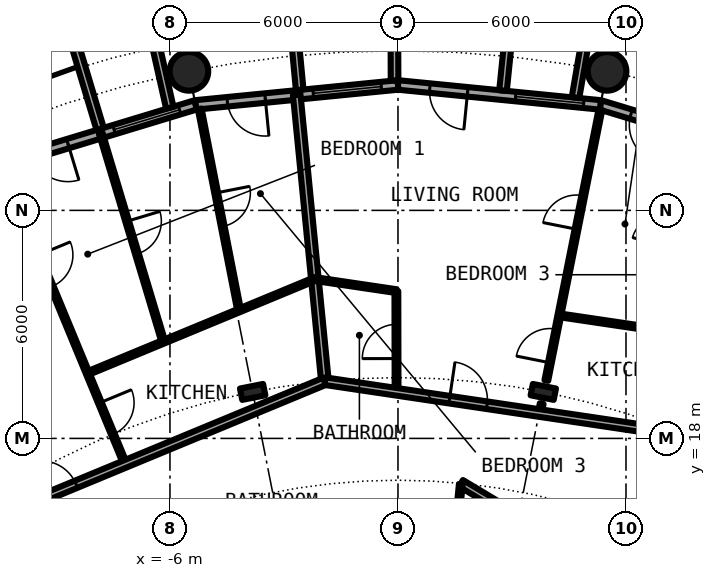
"""IFC4 building model, lengths in metres.
Left out: names, types, materials, properties, quantities, classifications, styles, units other than length and angle.
Written with IfcOpenShell. Run it as: python <this file> out.ifc"""

import sys

from ifc_helpers import new_model, si_unit, direction, frame, frame_2d, origin, origin_2d, place, context, subcontext, project, spatial, rectangle, hollow_circle, i_section, extrude, element, fill, save


model = new_model("IFC4")
c1 = context("Model", 3, precision=1e-05, world=origin(), true_north=direction((0.0, 1.0)))
c2 = subcontext(c1, "Body", "Model", "MODEL_VIEW")
j1 = project(units=[si_unit("LENGTHUNIT", "METRE"), si_unit("PLANEANGLEUNIT", "RADIAN")], contexts=[c1])
p1 = place(None, origin())
s1 = spatial("IfcSite", under=j1, at=p1, CompositionType="ELEMENT")
p2 = place(p1, origin())
s2 = spatial("IfcBuilding", under=s1, at=p2, CompositionType="ELEMENT")
p3 = place(p2, frame((0.0, 0.0, 47.2)))
s3 = spatial("IfcBuildingStorey", under=s2, at=p3, CompositionType="ELEMENT", Elevation=47.2)
for number, where, z_axis, x_axis in (
    (1, (5.501, 27.658, 0.0), (0.0, 0.0, 1.0), (1.0, 0.0, 0.0)),
    (2, (-5.501, 27.658, 0.0), (0.0, 0.0, 1.0), (1.0, 0.0, 0.0)),
):
    element("IfcColumn", number, at=place(p3, frame(where, z_axis=z_axis, x_axis=x_axis)), inside=s3, PredefinedType="COLUMN", context=c2, shape_type="SweptSolid", body=[
        extrude(hollow_circle(Radius=0.508, WallThickness=0.05, at=origin_2d()), origin(), (0.0, 0.0, 1.0), 3.05),
    ])
for number, where, z_axis, x_axis in (
    (3, (3.824, 19.223, 0.0), (0.0, 0.0, 1.0), (0.195, 0.981, 0.0)),
    (4, (-3.824, 19.223, 0.0), (0.0, 0.0, 1.0), (-0.195, 0.981, 0.0)),
):
    element("IfcColumn", number, at=place(p3, frame(where, z_axis=z_axis, x_axis=x_axis)), inside=s3, PredefinedType="COLUMN", context=c2, shape_type="SweptSolid", body=[
        extrude(i_section(OverallWidth=0.305, OverallDepth=0.62, WebThickness=0.021, FlangeThickness=0.04, FilletRadius=0.027, at=origin_2d()), origin(), (0.0, 0.0, 1.0), 3.05),
    ])
p4 = place(p3, frame((10.447, 25.222, 0.0), z_axis=(0.0, 0.0, 1.0), x_axis=(-0.956965678721, 0.290201119486, 0.0)))
e5 = element("IfcWall", 5, at=p4, inside=s3, PredefinedType="SOLIDWALL", context=c2, shape_type="SweptSolid", body=[
    extrude(rectangle(XDim=5.351, YDim=0.25, at=frame_2d((2.676, 0.0))), origin(), (0.0, 0.0, 1.0), 2.7),
])
p5 = place(p4, frame((0.441, 0.0, 0.3)))
e6 = element("IfcOpeningElement", 6, at=p5, cuts=e5, PredefinedType="OPENING", context=c2, shape_type="SweptSolid", body=[
    extrude(rectangle(XDim=1.8, YDim=2.1, at=frame_2d((0.9, 1.05))), frame((0.0, 0.135, 0.0), z_axis=(0.0, -1.0, 0.0), x_axis=(1.0, 0.0, 0.0)), (0.0, 0.0, 1.0), 0.27),
])
p6 = place(p4, frame((3.51, 0.0, 0.0)))
e7 = element("IfcOpeningElement", 7, at=p6, cuts=e5, PredefinedType="OPENING", context=c2, shape_type="SweptSolid", body=[
    extrude(rectangle(XDim=1.0, YDim=2.2, at=frame_2d((0.5, 1.1))), frame((0.0, 0.135, 0.0), z_axis=(0.0, -1.0, 0.0), x_axis=(1.0, 0.0, 0.0)), (0.0, 0.0, 1.0), 0.27),
])
p7 = place(p3, frame((5.326, 26.775, 0.0), z_axis=(0.0, 0.0, 1.0), x_axis=(-0.995173996315, 0.098126026407, 0.0)))
e8 = element("IfcWall", 8, at=p7, inside=s3, PredefinedType="SOLIDWALL", context=c2, shape_type="SweptSolid", body=[
    extrude(rectangle(XDim=5.352, YDim=0.25, at=frame_2d((2.676, 0.0))), origin(), (0.0, 0.0, 1.0), 2.7),
])
p8 = place(p7, frame((0.441, 0.0, 0.3)))
e9 = element("IfcOpeningElement", 9, at=p8, cuts=e8, PredefinedType="OPENING", context=c2, shape_type="SweptSolid", body=[
    extrude(rectangle(XDim=1.8, YDim=2.1, at=frame_2d((0.9, 1.05))), frame((0.0, 0.135, 0.0), z_axis=(0.0, -1.0, 0.0), x_axis=(1.0, 0.0, 0.0)), (0.0, 0.0, 1.0), 0.27),
])
p9 = place(p7, frame((3.51, 0.0, 0.0)))
e10 = element("IfcOpeningElement", 10, at=p9, cuts=e8, PredefinedType="OPENING", context=c2, shape_type="SweptSolid", body=[
    extrude(rectangle(XDim=1.0, YDim=2.2, at=frame_2d((0.5, 1.1))), frame((0.0, 0.135, 0.0), z_axis=(0.0, -1.0, 0.0), x_axis=(1.0, 0.0, 0.0)), (0.0, 0.0, 1.0), 0.27),
])
p10 = place(p3, frame((4.671, 26.966, -0.03), z_axis=(0.0, 0.0, 1.0), x_axis=(0.170539878907, 0.985350774954, 0.0)))
e11 = element("IfcWall", 11, at=p10, inside=s3, PredefinedType="SOLIDWALL", context=c2, shape_type="SweptSolid", body=[
    extrude(rectangle(XDim=2.932, YDim=0.2, at=frame_2d((1.466, 0.0))), origin(), (0.0, 0.0, 1.0), 2.73),
])
p11 = place(p3, frame((2.764, 27.153, -0.03), z_axis=(0.0, 0.0, 1.0), x_axis=(0.101505487237, 0.994834979311, 0.0)))
e12 = element("IfcWall", 12, at=p11, inside=s3, PredefinedType="SOLIDWALL", context=c2, shape_type="SweptSolid", body=[
    extrude(rectangle(XDim=3.007, YDim=0.2, at=frame_2d((1.503, 0.0))), origin(), (0.0, 0.0, 1.0), 2.73),
])
p12 = place(p3, frame((0.0, 27.3, 0.0), z_axis=(0.0, 0.0, 1.0), x_axis=(-0.995173996315, -0.098126026407, 0.0)))
e13 = element("IfcWall", 13, at=p12, inside=s3, PredefinedType="SOLIDWALL", context=c2, shape_type="SweptSolid", body=[
    extrude(rectangle(XDim=5.352, YDim=0.25, at=frame_2d((2.676, 0.0))), origin(), (0.0, 0.0, 1.0), 2.7),
])
p13 = place(p12, frame((0.441, 0.0, 0.3)))
e14 = element("IfcOpeningElement", 14, at=p13, cuts=e13, PredefinedType="OPENING", context=c2, shape_type="SweptSolid", body=[
    extrude(rectangle(XDim=1.8, YDim=2.1, at=frame_2d((0.9, 1.05))), frame((0.0, 0.135, 0.0), z_axis=(0.0, -1.0, 0.0), x_axis=(1.0, 0.0, 0.0)), (0.0, 0.0, 1.0), 0.27),
])
p14 = place(p12, frame((3.51, 0.0, 0.0)))
e15 = element("IfcOpeningElement", 15, at=p14, cuts=e13, PredefinedType="OPENING", context=c2, shape_type="SweptSolid", body=[
    extrude(rectangle(XDim=1.0, YDim=2.2, at=frame_2d((0.5, 1.1))), frame((0.0, 0.135, 0.0), z_axis=(0.0, -1.0, 0.0), x_axis=(1.0, 0.0, 0.0)), (0.0, 0.0, 1.0), 0.27),
])
p15 = place(p3, frame((-0.09, 27.417, -0.03), z_axis=(0.0, 0.0, 1.0), x_axis=(-0.00347308367, 0.999993968827, 0.0)))
e16 = element("IfcWall", 16, at=p15, inside=s3, PredefinedType="SOLIDWALL", context=c2, shape_type="SweptSolid", body=[
    extrude(rectangle(XDim=2.882, YDim=0.2, at=frame_2d((1.441, 0.0))), origin(), (0.0, 0.0, 1.0), 2.73),
])
p16 = place(p3, frame((-2.586, 27.171, -0.03), z_axis=(0.0, 0.0, 1.0), x_axis=(-0.094548432284, 0.995520262954, 0.0)))
e17 = element("IfcWall", 17, at=p16, inside=s3, PredefinedType="SOLIDWALL", context=c2, shape_type="SweptSolid", body=[
    extrude(rectangle(XDim=3.006, YDim=0.2, at=frame_2d((1.503, 0.0))), origin(), (0.0, 0.0, 1.0), 2.73),
])
p17 = place(p3, frame((-5.326, 26.775, 0.0), z_axis=(0.0, 0.0, 1.0), x_axis=(-0.956965678721, -0.290201119486, 0.0)))
e18 = element("IfcWall", 18, at=p17, inside=s3, PredefinedType="SOLIDWALL", context=c2, shape_type="SweptSolid", body=[
    extrude(rectangle(XDim=5.351, YDim=0.25, at=frame_2d((2.676, 0.0))), origin(), (0.0, 0.0, 1.0), 2.7),
])
p18 = place(p17, frame((0.441, 0.0, 0.3)))
e19 = element("IfcOpeningElement", 19, at=p18, cuts=e18, PredefinedType="OPENING", context=c2, shape_type="SweptSolid", body=[
    extrude(rectangle(XDim=1.8, YDim=2.1, at=frame_2d((0.9, 1.05))), frame((0.0, 0.135, 0.0), z_axis=(0.0, -1.0, 0.0), x_axis=(1.0, 0.0, 0.0)), (0.0, 0.0, 1.0), 0.27),
])
p19 = place(p17, frame((3.51, 0.0, 0.0)))
e20 = element("IfcOpeningElement", 20, at=p19, cuts=e18, PredefinedType="OPENING", context=c2, shape_type="SweptSolid", body=[
    extrude(rectangle(XDim=1.0, YDim=2.2, at=frame_2d((0.5, 1.1))), frame((0.0, 0.135, 0.0), z_axis=(0.0, -1.0, 0.0), x_axis=(1.0, 0.0, 0.0)), (0.0, 0.0, 1.0), 0.27),
])
p20 = place(p3, frame((-6.004, 26.7, -0.03), z_axis=(0.0, 0.0, 1.0), x_axis=(-0.219609259383, 0.975587911566, 0.0)))
e21 = element("IfcWall", 21, at=p20, inside=s3, PredefinedType="SOLIDWALL", context=c2, shape_type="SweptSolid", body=[
    extrude(rectangle(XDim=2.933, YDim=0.2, at=frame_2d((1.466, 0.0))), origin(), (0.0, 0.0, 1.0), 2.73),
])
p21 = place(p3, frame((-7.837, 26.144, -0.03), z_axis=(0.0, 0.0, 1.0), x_axis=(-0.287064767992, 0.957911174889, 0.0)))
e22 = element("IfcWall", 22, at=p21, inside=s3, PredefinedType="SOLIDWALL", context=c2, shape_type="SweptSolid", body=[
    extrude(rectangle(XDim=3.006, YDim=0.2, at=frame_2d((1.503, 0.0))), origin(), (0.0, 0.0, 1.0), 2.73),
])
p22 = place(p3, frame((-10.398, 25.107, 0.0), z_axis=(0.0, 0.0, 1.0), x_axis=(0.382458509789, -0.923972666419, 0.0)))
e23 = element("IfcWall", 23, at=p22, inside=s3, PredefinedType="PARTITIONING", context=c2, shape_type="SweptSolid", body=[
    extrude(rectangle(XDim=8.419, YDim=0.1, at=frame_2d((4.209, 0.0))), origin(), (0.0, 0.0, 1.0), 2.7),
])
p23 = place(p22, frame((6.677, 0.0, 0.0)))
e24 = element("IfcOpeningElement", 24, at=p23, cuts=e23, PredefinedType="OPENING", context=c2, shape_type="SweptSolid", body=[
    extrude(rectangle(XDim=0.9, YDim=2.3, at=frame_2d((0.45, 1.15))), frame((0.0, 0.06, 0.0), z_axis=(0.0, -1.0, 0.0), x_axis=(1.0, 0.0, 0.0)), (0.0, 0.0, 1.0), 0.12),
])
p24 = place(p22, frame((2.468, 0.0, 0.0)))
e25 = element("IfcOpeningElement", 25, at=p24, cuts=e23, PredefinedType="OPENING", context=c2, shape_type="SweptSolid", body=[
    extrude(rectangle(XDim=0.9, YDim=2.3, at=frame_2d((0.45, 1.15))), frame((0.0, 0.06, 0.0), z_axis=(0.0, -1.0, 0.0), x_axis=(1.0, 0.0, 0.0)), (0.0, 0.0, 1.0), 0.12),
])
p25 = place(p3, frame((-7.821, 26.025, 0.0), z_axis=(0.0, 0.0, 1.0), x_axis=(0.287793773423, -0.957692405723, 0.0)))
e26 = element("IfcWall", 26, at=p25, inside=s3, PredefinedType="PARTITIONING", context=c2, shape_type="SweptSolid", body=[
    extrude(rectangle(XDim=5.726, YDim=0.1, at=frame_2d((2.863, 0.0))), origin(), (0.0, 0.0, 1.0), 2.7),
])
p26 = place(p25, frame((2.413, 0.0, 0.0)))
e27 = element("IfcOpeningElement", 27, at=p26, cuts=e26, PredefinedType="OPENING", context=c2, shape_type="SweptSolid", body=[
    extrude(rectangle(XDim=0.9, YDim=2.3, at=frame_2d((0.45, 1.15))), frame((0.0, 0.06, 0.0), z_axis=(0.0, -1.0, 0.0), x_axis=(1.0, 0.0, 0.0)), (0.0, 0.0, 1.0), 0.12),
])
p27 = place(p3, frame((-5.217, 26.67, 0.0), z_axis=(0.0, 0.0, 1.0), x_axis=(0.192109041462, -0.981373586453, 0.0)))
e28 = element("IfcWall", 28, at=p27, inside=s3, PredefinedType="PARTITIONING", context=c2, shape_type="SweptSolid", body=[
    extrude(rectangle(XDim=5.404, YDim=0.1, at=frame_2d((2.702, 0.0))), origin(), (0.0, 0.0, 1.0), 2.7),
])
p28 = place(p27, frame((2.252, 0.0, 0.0)))
e29 = element("IfcOpeningElement", 29, at=p28, cuts=e28, PredefinedType="OPENING", context=c2, shape_type="SweptSolid", body=[
    extrude(rectangle(XDim=0.9, YDim=2.3, at=frame_2d((0.45, 1.15))), frame((0.0, 0.06, 0.0), z_axis=(0.0, -1.0, 0.0), x_axis=(1.0, 0.0, 0.0)), (0.0, 0.0, 1.0), 0.12),
])
p29 = place(p3, frame((-2.665, 27.044, 0.0), z_axis=(0.0, 0.0, 1.0), x_axis=(0.098083473227, -0.99517819122, 0.0)))
e30 = element("IfcWall", 30, at=p29, inside=s3, PredefinedType="PARTITIONING", context=c2, shape_type="SweptSolid", body=[
    extrude(rectangle(XDim=7.574, YDim=0.2, at=frame_2d((3.787, 0.0))), origin(), (0.0, 0.0, 1.0), 2.7),
])
p30 = place(p3, frame((-0.037, 19.226, 0.0), z_axis=(0.0, 0.0, 1.0), x_axis=(-0.001843314841, 0.999998301094, 0.0)))
e31 = element("IfcWall", 31, at=p30, inside=s3, PredefinedType="PARTITIONING", context=c2, shape_type="SweptSolid", body=[
    extrude(rectangle(XDim=2.649, YDim=0.1, at=frame_2d((1.324, 0.0))), origin(), (0.0, 0.0, 1.0), 2.7),
])
p31 = place(p30, frame((0.875, 0.0, 0.0)))
e32 = element("IfcOpeningElement", 32, at=p31, cuts=e31, PredefinedType="OPENING", context=c2, shape_type="SweptSolid", body=[
    extrude(rectangle(XDim=0.9, YDim=2.3, at=frame_2d((0.45, 1.15))), frame((0.0, 0.06, 0.0), z_axis=(0.0, -1.0, 0.0), x_axis=(1.0, 0.0, 0.0)), (0.0, 0.0, 1.0), 0.12),
])
p32 = place(p3, frame((3.733, 18.667, 0.0), z_axis=(0.0, 0.0, 1.0), x_axis=(0.193340656307, 0.981131688724, 0.0)))
e33 = element("IfcWall", 33, at=p32, inside=s3, PredefinedType="PARTITIONING", context=c2, shape_type="SweptSolid", body=[
    extrude(rectangle(XDim=0.254, YDim=0.1, at=frame_2d((0.127, 0.0))), origin(), (0.0, 0.0, 1.0), 2.7),
])
p33 = place(p3, frame((3.904, 19.524, 0.0), z_axis=(0.0, 0.0, 1.0), x_axis=(0.195857618189, 0.980632343642, 0.0)))
e34 = element("IfcWall", 34, at=p33, inside=s3, PredefinedType="PARTITIONING", context=c2, shape_type="SweptSolid", body=[
    extrude(rectangle(XDim=7.265, YDim=0.1, at=frame_2d((3.632, 0.0))), origin(), (0.0, 0.0, 1.0), 2.7),
])
p34 = place(p33, frame((0.476, 0.0, 0.0)))
e35 = element("IfcOpeningElement", 35, at=p34, cuts=e34, PredefinedType="OPENING", context=c2, shape_type="SweptSolid", body=[
    extrude(rectangle(XDim=0.9, YDim=2.3, at=frame_2d((0.45, 1.15))), frame((0.0, 0.06, 0.0), z_axis=(0.0, -1.0, 0.0), x_axis=(1.0, 0.0, 0.0)), (0.0, 0.0, 1.0), 0.12),
])
p35 = place(p33, frame((4.058, 0.0, 0.0)))
e36 = element("IfcOpeningElement", 36, at=p35, cuts=e34, PredefinedType="OPENING", context=c2, shape_type="SweptSolid", body=[
    extrude(rectangle(XDim=0.9, YDim=2.3, at=frame_2d((0.45, 1.15))), frame((0.0, 0.06, 0.0), z_axis=(0.0, -1.0, 0.0), x_axis=(1.0, 0.0, 0.0)), (0.0, 0.0, 1.0), 0.12),
])
p36 = place(p3, frame((1.658, 16.819, 0.0), z_axis=(0.0, 0.0, 1.0), x_axis=(0.857688434449, -0.514169767113, 0.0)))
e37 = element("IfcWall", 37, at=p36, inside=s3, PredefinedType="PARTITIONING", context=c2, shape_type="SweptSolid", body=[
    extrude(rectangle(XDim=14.429, YDim=0.2, at=frame_2d((7.215, 0.0))), origin(), (0.0, 0.0, 1.0), 2.7),
])
p37 = place(p36, frame((4.316, 0.0, 0.0)))
e38 = element("IfcOpeningElement", 38, at=p37, cuts=e37, PredefinedType="OPENING", context=c2, shape_type="SweptSolid", body=[
    extrude(rectangle(XDim=1.0, YDim=2.3, at=frame_2d((0.5, 1.15))), frame((0.0, 0.11, 0.0), z_axis=(0.0, -1.0, 0.0), x_axis=(1.0, 0.0, 0.0)), (0.0, 0.0, 1.0), 0.22),
])
p38 = place(p3, frame((-12.435, 15.15, 0.0), z_axis=(0.0, 0.0, 1.0), x_axis=(0.923845560554, 0.38276543763, 0.0)))
e39 = element("IfcWall", 39, at=p38, inside=s3, PredefinedType="PARTITIONING", context=c2, shape_type="SweptSolid", body=[
    extrude(rectangle(XDim=11.381, YDim=0.2, at=frame_2d((5.69, 0.0))), origin(), (0.0, 0.0, 1.0), 2.7),
])
p39 = place(p38, frame((3.293, 0.0, 0.0)))
e40 = element("IfcOpeningElement", 40, at=p39, cuts=e39, PredefinedType="OPENING", context=c2, shape_type="SweptSolid", body=[
    extrude(rectangle(XDim=1.0, YDim=2.3, at=frame_2d((0.5, 1.15))), frame((0.0, 0.11, 0.0), z_axis=(0.0, -1.0, 0.0), x_axis=(1.0, 0.0, 0.0)), (0.0, 0.0, 1.0), 0.22),
])
p40 = place(p3, frame((-1.921, 19.506, 0.0), z_axis=(0.0, 0.0, 1.0), x_axis=(0.989134446023, -0.147013767014, 0.0)))
e41 = element("IfcWall", 41, at=p40, inside=s3, PredefinedType="PARTITIONING", context=c2, shape_type="SweptSolid", body=[
    extrude(rectangle(XDim=9.531, YDim=0.2, at=frame_2d((4.765, 0.0))), origin(), (0.0, 0.0, 1.0), 2.38),
])
p41 = place(p40, frame((3.31, 0.0, 0.0)))
e42 = element("IfcOpeningElement", 42, at=p41, cuts=e41, PredefinedType="OPENING", context=c2, shape_type="SweptSolid", body=[
    extrude(rectangle(XDim=1.0, YDim=2.3, at=frame_2d((0.5, 1.15))), frame((0.0, 0.11, 0.0), z_axis=(0.0, -1.0, 0.0), x_axis=(1.0, 0.0, 0.0)), (0.0, 0.0, 1.0), 0.22),
])
p42 = place(p3, frame((-8.166, 19.715, 0.0), z_axis=(0.0, 0.0, 1.0), x_axis=(0.923844914631, 0.382766996632, 0.0)))
e43 = element("IfcWall", 43, at=p42, inside=s3, PredefinedType="PARTITIONING", context=c2, shape_type="SweptSolid", body=[
    extrude(rectangle(XDim=6.474, YDim=0.1, at=frame_2d((3.237, 0.0))), origin(), (0.0, 0.0, 1.0), 2.7),
])
p43 = place(p3, frame((-2.186, 22.193, 0.0), z_axis=(0.0, 0.0, 1.0), x_axis=(0.989171386505, -0.146765009863, 0.0)))
e44 = element("IfcWall", 44, at=p43, inside=s3, PredefinedType="PARTITIONING", context=c2, shape_type="SweptSolid", body=[
    extrude(rectangle(XDim=2.167, YDim=0.1, at=frame_2d((1.084, 0.0))), origin(), (0.0, 0.0, 1.0), 2.7),
])
p44 = place(p3, frame((4.246, 21.239, 0.0), z_axis=(0.0, 0.0, 1.0), x_axis=(0.989178348771, -0.146718077695, 0.0)))
e45 = element("IfcWall", 45, at=p44, inside=s3, PredefinedType="PARTITIONING", context=c2, shape_type="SweptSolid", body=[
    extrude(rectangle(XDim=4.335, YDim=0.1, at=frame_2d((2.167, 0.0))), origin(), (0.0, 0.0, 1.0), 2.7),
])
p45 = place(p3, frame((1.394, 14.154, 0.0), z_axis=(0.0, 0.0, 1.0), x_axis=(0.097901702875, 0.995196089509, 0.0)))
e46 = element("IfcWall", 46, at=p45, inside=s3, PredefinedType="PARTITIONING", context=c2, shape_type="SweptSolid", body=[
    extrude(rectangle(XDim=2.656, YDim=0.1, at=frame_2d((1.328, 0.0))), origin(), (0.0, 0.0, 1.0), 2.7),
])
p46 = place(p6, origin())
e47 = element("IfcDoor", 47, at=p46, inside=s3, OperationType="SINGLE_SWING_LEFT", PredefinedType="DOOR", context=c2, shape_type="SweptSolid", body=[
    extrude(rectangle(XDim=1.0, YDim=2.2, at=frame_2d((0.5, 1.1))), frame((0.0, 0.025, 0.0), z_axis=(0.0, -1.0, 0.0), x_axis=(1.0, 0.0, 0.0)), (0.0, 0.0, 1.0), 0.05),
])
fill(e7, e47)
p47 = place(p8, origin())
e48 = element("IfcWindow", 48, at=p47, inside=s3, PartitioningType="SINGLE_PANEL", PredefinedType="WINDOW", context=c2, shape_type="SweptSolid", body=[
    extrude(rectangle(XDim=1.8, YDim=2.1, at=frame_2d((0.9, 1.05))), frame((0.0, 0.03, 0.0), z_axis=(0.0, -1.0, 0.0), x_axis=(1.0, 0.0, 0.0)), (0.0, 0.0, 1.0), 0.06),
])
fill(e9, e48)
p48 = place(p9, origin())
e49 = element("IfcDoor", 49, at=p48, inside=s3, OperationType="SINGLE_SWING_LEFT", PredefinedType="DOOR", context=c2, shape_type="SweptSolid", body=[
    extrude(rectangle(XDim=1.0, YDim=2.2, at=frame_2d((0.5, 1.1))), frame((0.0, 0.025, 0.0), z_axis=(0.0, -1.0, 0.0), x_axis=(1.0, 0.0, 0.0)), (0.0, 0.0, 1.0), 0.05),
])
fill(e10, e49)
p49 = place(p13, origin())
e50 = element("IfcWindow", 50, at=p49, inside=s3, PartitioningType="SINGLE_PANEL", PredefinedType="WINDOW", context=c2, shape_type="SweptSolid", body=[
    extrude(rectangle(XDim=1.8, YDim=2.1, at=frame_2d((0.9, 1.05))), frame((0.0, 0.03, 0.0), z_axis=(0.0, -1.0, 0.0), x_axis=(1.0, 0.0, 0.0)), (0.0, 0.0, 1.0), 0.06),
])
fill(e14, e50)
p50 = place(p14, origin())
e51 = element("IfcDoor", 51, at=p50, inside=s3, OperationType="SINGLE_SWING_LEFT", PredefinedType="DOOR", context=c2, shape_type="SweptSolid", body=[
    extrude(rectangle(XDim=1.0, YDim=2.2, at=frame_2d((0.5, 1.1))), frame((0.0, 0.025, 0.0), z_axis=(0.0, -1.0, 0.0), x_axis=(1.0, 0.0, 0.0)), (0.0, 0.0, 1.0), 0.05),
])
fill(e15, e51)
p51 = place(p18, origin())
e52 = element("IfcWindow", 52, at=p51, inside=s3, PartitioningType="SINGLE_PANEL", PredefinedType="WINDOW", context=c2, shape_type="SweptSolid", body=[
    extrude(rectangle(XDim=1.8, YDim=2.1, at=frame_2d((0.9, 1.05))), frame((0.0, 0.03, 0.0), z_axis=(0.0, -1.0, 0.0), x_axis=(1.0, 0.0, 0.0)), (0.0, 0.0, 1.0), 0.06),
])
fill(e19, e52)
p52 = place(p19, origin())
e53 = element("IfcDoor", 53, at=p52, inside=s3, OperationType="SINGLE_SWING_LEFT", PredefinedType="DOOR", context=c2, shape_type="SweptSolid", body=[
    extrude(rectangle(XDim=1.0, YDim=2.2, at=frame_2d((0.5, 1.1))), frame((0.0, 0.025, 0.0), z_axis=(0.0, -1.0, 0.0), x_axis=(1.0, 0.0, 0.0)), (0.0, 0.0, 1.0), 0.05),
])
fill(e20, e53)
p53 = place(p41, origin())
e54 = element("IfcDoor", 54, at=p53, inside=s3, OperationType="SINGLE_SWING_LEFT", PredefinedType="DOOR", context=c2, shape_type="SweptSolid", body=[
    extrude(rectangle(XDim=1.0, YDim=2.3, at=frame_2d((0.5, 1.15))), frame((0.0, 0.025, 0.0), z_axis=(0.0, -1.0, 0.0), x_axis=(1.0, 0.0, 0.0)), (0.0, 0.0, 1.0), 0.05),
])
fill(e42, e54)
p54 = place(p31, origin())
e55 = element("IfcDoor", 55, at=p54, inside=s3, OperationType="SINGLE_SWING_RIGHT", PredefinedType="DOOR", context=c2, shape_type="SweptSolid", body=[
    extrude(rectangle(XDim=0.9, YDim=2.3, at=frame_2d((0.45, 1.15))), frame((0.0, 0.025, 0.0), z_axis=(0.0, -1.0, 0.0), x_axis=(1.0, 0.0, 0.0)), (0.0, 0.0, 1.0), 0.05),
])
fill(e32, e55)
p55 = place(p34, origin())
e56 = element("IfcDoor", 56, at=p55, inside=s3, OperationType="SINGLE_SWING_LEFT", PredefinedType="DOOR", context=c2, shape_type="SweptSolid", body=[
    extrude(rectangle(XDim=0.9, YDim=2.3, at=frame_2d((0.45, 1.15))), frame((0.0, 0.025, 0.0), z_axis=(0.0, -1.0, 0.0), x_axis=(1.0, 0.0, 0.0)), (0.0, 0.0, 1.0), 0.05),
])
fill(e35, e56)
p56 = place(p35, origin())
e57 = element("IfcDoor", 57, at=p56, inside=s3, OperationType="SINGLE_SWING_RIGHT", PredefinedType="DOOR", context=c2, shape_type="SweptSolid", body=[
    extrude(rectangle(XDim=0.9, YDim=2.3, at=frame_2d((0.45, 1.15))), frame((0.0, 0.025, 0.0), z_axis=(0.0, -1.0, 0.0), x_axis=(1.0, 0.0, 0.0)), (0.0, 0.0, 1.0), 0.05),
])
fill(e36, e57)
p57 = place(p39, origin())
e58 = element("IfcDoor", 58, at=p57, inside=s3, OperationType="SINGLE_SWING_LEFT", PredefinedType="DOOR", context=c2, shape_type="SweptSolid", body=[
    extrude(rectangle(XDim=1.0, YDim=2.3, at=frame_2d((0.5, 1.15))), frame((0.0, 0.025, 0.0), z_axis=(0.0, -1.0, 0.0), x_axis=(1.0, 0.0, 0.0)), (0.0, 0.0, 1.0), 0.05),
])
fill(e40, e58)
p58 = place(p23, origin())
e59 = element("IfcDoor", 59, at=p58, inside=s3, OperationType="SINGLE_SWING_RIGHT", PredefinedType="DOOR", context=c2, shape_type="SweptSolid", body=[
    extrude(rectangle(XDim=0.9, YDim=2.3, at=frame_2d((0.45, 1.15))), frame((0.0, 0.025, 0.0), z_axis=(0.0, -1.0, 0.0), x_axis=(1.0, 0.0, 0.0)), (0.0, 0.0, 1.0), 0.05),
])
fill(e24, e59)
p59 = place(p24, origin())
e60 = element("IfcDoor", 60, at=p59, inside=s3, OperationType="SINGLE_SWING_LEFT", PredefinedType="DOOR", context=c2, shape_type="SweptSolid", body=[
    extrude(rectangle(XDim=0.9, YDim=2.3, at=frame_2d((0.45, 1.15))), frame((0.0, 0.025, 0.0), z_axis=(0.0, -1.0, 0.0), x_axis=(1.0, 0.0, 0.0)), (0.0, 0.0, 1.0), 0.05),
])
fill(e25, e60)
p60 = place(p26, origin())
e61 = element("IfcDoor", 61, at=p60, inside=s3, OperationType="SINGLE_SWING_LEFT", PredefinedType="DOOR", context=c2, shape_type="SweptSolid", body=[
    extrude(rectangle(XDim=0.9, YDim=2.3, at=frame_2d((0.45, 1.15))), frame((0.0, 0.025, 0.0), z_axis=(0.0, -1.0, 0.0), x_axis=(1.0, 0.0, 0.0)), (0.0, 0.0, 1.0), 0.05),
])
fill(e27, e61)
p61 = place(p28, origin())
e62 = element("IfcDoor", 62, at=p61, inside=s3, OperationType="SINGLE_SWING_RIGHT", PredefinedType="DOOR", context=c2, shape_type="SweptSolid", body=[
    extrude(rectangle(XDim=0.9, YDim=2.3, at=frame_2d((0.45, 1.15))), frame((0.0, 0.025, 0.0), z_axis=(0.0, -1.0, 0.0), x_axis=(1.0, 0.0, 0.0)), (0.0, 0.0, 1.0), 0.05),
])
fill(e29, e62)
save(model, sys.argv[1])
